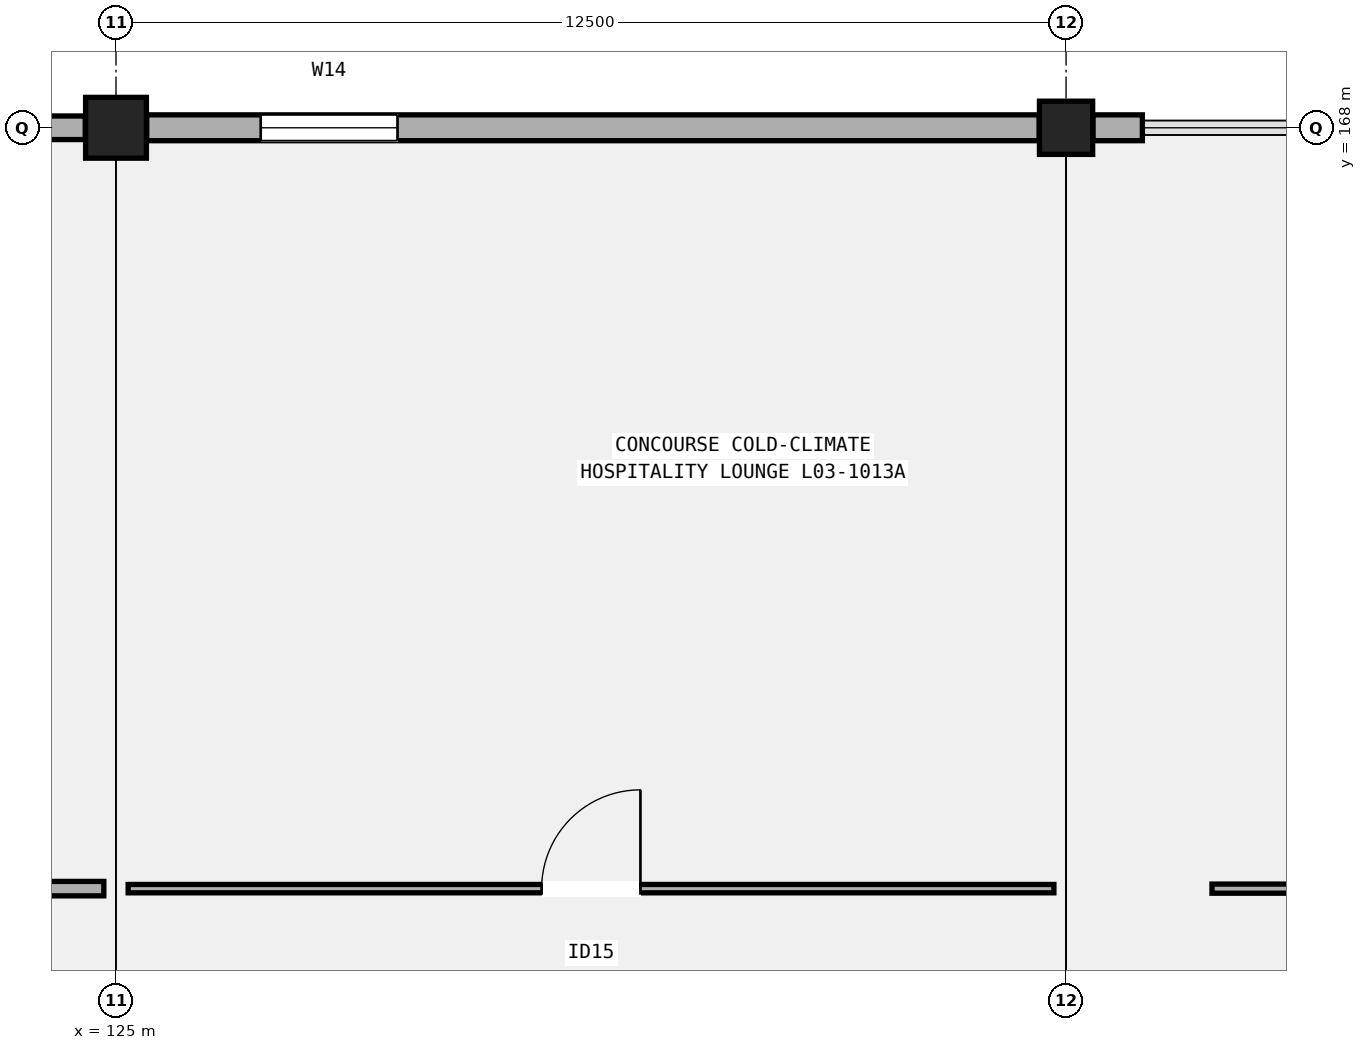
"""IFC4 building model, lengths in metres.
Left out: names, types, materials, properties, quantities, classifications, styles, units other than length and angle.
Written with IfcOpenShell. Run it as: python <this file> out.ifc"""

import sys

from ifc_helpers import new_model, si_unit, direction, frame, frame_2d, origin, origin_2d, place, context, subcontext, project, spatial, rectangle, extrude, element, fill, save


model = new_model("IFC4")
c1 = context("Model", 3, precision=1e-05, world=origin(), true_north=direction((0.0, 1.0)))
c2 = subcontext(c1, "Body", "Model", "MODEL_VIEW")
j1 = project(units=[si_unit("LENGTHUNIT", "METRE"), si_unit("PLANEANGLEUNIT", "RADIAN")], contexts=[c1])
p1 = place(None, origin())
s1 = spatial("IfcSite", under=j1, at=p1, CompositionType="ELEMENT")
p2 = place(p1, origin())
s2 = spatial("IfcBuilding", under=s1, at=p2, CompositionType="ELEMENT")
p3 = place(p2, frame((0.0, 0.0, 15.3)))
s3 = spatial("IfcBuildingStorey", under=s2, at=p3, CompositionType="ELEMENT", Elevation=15.3)
p4 = place(p3, frame((125.0, 168.0, 0.0), z_axis=(0.0, 0.0, 1.0), x_axis=(1.0, 0.0, 0.0)))
e1 = element("IfcColumn", 1, at=p4, inside=s3, PredefinedType="COLUMN", context=c2, shape_type="SweptSolid", body=[
    extrude(rectangle(XDim=0.8, YDim=0.8, at=origin_2d()), origin(), (0.0, 0.0, 1.0), 5.1),
])
p5 = place(p3, frame((137.5, 168.0, 0.0), z_axis=(0.0, 0.0, 1.0), x_axis=(1.0, 0.0, 0.0)))
e2 = element("IfcColumn", 2, at=p5, inside=s3, PredefinedType="COLUMN", context=c2, shape_type="SweptSolid", body=[
    extrude(rectangle(XDim=0.7, YDim=0.7, at=origin_2d()), origin(), (0.0, 0.0, 1.0), 5.1),
])
p6 = place(p3, frame((112.179, 168.0, 0.0), z_axis=(0.0, 0.0, 1.0), x_axis=(1.0, 0.0, 0.0)))
e3 = element("IfcWall", 3, at=p6, inside=s3, PredefinedType="SOLIDWALL", context=c2, shape_type="SweptSolid", body=[
    extrude(rectangle(XDim=12.417, YDim=0.31, at=frame_2d((6.208, 0.0))), origin(), (0.0, 0.0, 1.0), 4.172),
])
p7 = place(p6, frame((2.75, 0.0, 0.95)))
e4 = element("IfcOpeningElement", 4, at=p7, cuts=e3, PredefinedType="OPENING", context=c2, shape_type="SweptSolid", body=[
    extrude(rectangle(XDim=1.65, YDim=2.05, at=frame_2d((0.825, 1.025))), frame((0.0, 0.165, 0.0), z_axis=(0.0, -1.0, 0.0), x_axis=(1.0, 0.0, 0.0)), (0.0, 0.0, 1.0), 0.33),
])
p8 = place(p3, frame((125.404, 168.0, 0.0), z_axis=(0.0, 0.0, 1.0), x_axis=(1.0, 0.0, 0.0)))
e5 = element("IfcWall", 5, at=p8, inside=s3, PredefinedType="SOLIDWALL", context=c2, shape_type="SweptSolid", body=[
    extrude(rectangle(XDim=11.742, YDim=0.34, at=frame_2d((5.871, 0.0))), origin(), (0.0, 0.0, 1.0), 4.06),
])
p9 = place(p8, frame((1.5, 0.0, 0.95)))
e6 = element("IfcOpeningElement", 6, at=p9, cuts=e5, PredefinedType="OPENING", context=c2, shape_type="SweptSolid", body=[
    extrude(rectangle(XDim=1.8, YDim=2.15, at=frame_2d((0.9, 1.075))), frame((0.0, 0.18, 0.0), z_axis=(0.0, -1.0, 0.0), x_axis=(1.0, 0.0, 0.0)), (0.0, 0.0, 1.0), 0.36),
])
p10 = place(p3, frame((137.854, 168.0, 0.0), z_axis=(0.0, 0.0, 1.0), x_axis=(1.0, 0.0, 0.0)))
e7 = element("IfcWall", 7, at=p10, inside=s3, PredefinedType="SOLIDWALL", context=c2, shape_type="SweptSolid", body=[
    extrude(rectangle(XDim=0.65, YDim=0.34, at=frame_2d((0.325, 0.0))), origin(), (0.0, 0.0, 1.0), 4.16),
])
p11 = place(p3, frame((112.16, 157.99, 0.0), z_axis=(0.0, 0.0, 1.0), x_axis=(1.0, 0.0, 0.0)))
e8 = element("IfcWall", 8, at=p11, inside=s3, PredefinedType="PARTITIONING", context=c2, shape_type="SweptSolid", body=[
    extrude(rectangle(XDim=12.68, YDim=0.19, at=frame_2d((6.34, 0.0))), origin(), (0.0, 0.0, 1.0), 4.22),
])
p12 = place(p11, frame((5.75, 0.0, 0.0)))
e9 = element("IfcOpeningElement", 9, at=p12, cuts=e8, PredefinedType="OPENING", context=c2, shape_type="SweptSolid", body=[
    extrude(rectangle(XDim=1.18, YDim=2.2, at=frame_2d((0.59, 1.1))), frame((0.0, 0.105, 0.0), z_axis=(0.0, -1.0, 0.0), x_axis=(1.0, 0.0, 0.0)), (0.0, 0.0, 1.0), 0.21),
])
p13 = place(p3, frame((125.16, 157.99, 0.0), z_axis=(0.0, 0.0, 1.0), x_axis=(1.0, 0.0, 0.0)))
e10 = element("IfcWall", 10, at=p13, inside=s3, PredefinedType="PARTITIONING", context=c2, shape_type="SweptSolid", body=[
    extrude(rectangle(XDim=12.18, YDim=0.11, at=frame_2d((6.09, 0.0))), origin(), (0.0, 0.0, 1.0), 4.22),
])
p14 = place(p13, frame((5.44, 0.0, 0.0)))
e11 = element("IfcOpeningElement", 11, at=p14, cuts=e10, PredefinedType="OPENING", context=c2, shape_type="SweptSolid", body=[
    extrude(rectangle(XDim=1.3, YDim=2.24, at=frame_2d((0.65, 1.12))), frame((0.0, 0.065, 0.0), z_axis=(0.0, -1.0, 0.0), x_axis=(1.0, 0.0, 0.0)), (0.0, 0.0, 1.0), 0.13),
])
p15 = place(p3, frame((139.42, 157.99, 0.0), z_axis=(0.0, 0.0, 1.0), x_axis=(1.0, 0.0, 0.0)))
e12 = element("IfcWall", 12, at=p15, inside=s3, PredefinedType="PARTITIONING", context=c2, shape_type="SweptSolid", body=[
    extrude(rectangle(XDim=10.42, YDim=0.12, at=frame_2d((5.21, 0.0))), origin(), (0.0, 0.0, 1.0), 4.22),
])
p16 = place(p15, frame((4.47, 0.0, 0.0)))
e13 = element("IfcOpeningElement", 13, at=p16, cuts=e12, PredefinedType="OPENING", context=c2, shape_type="SweptSolid", body=[
    extrude(rectangle(XDim=1.48, YDim=2.24, at=frame_2d((0.74, 1.12))), frame((0.0, 0.07, 0.0), z_axis=(0.0, -1.0, 0.0), x_axis=(1.0, 0.0, 0.0)), (0.0, 0.0, 1.0), 0.14),
])
p17 = place(p9, origin())
e14 = element("IfcWindow", 14, at=p17, inside=s3, PartitioningType="SINGLE_PANEL", PredefinedType="WINDOW", context=c2, shape_type="SweptSolid", body=[
    extrude(rectangle(XDim=1.8, YDim=2.15, at=frame_2d((0.9, 1.075))), frame((0.0, 0.03, 0.0), z_axis=(0.0, -1.0, 0.0), x_axis=(1.0, 0.0, 0.0)), (0.0, 0.0, 1.0), 0.06),
])
fill(e6, e14)
p18 = place(p14, origin())
e15 = element("IfcDoor", 15, at=p18, inside=s3, OperationType="SINGLE_SWING_RIGHT", PredefinedType="DOOR", context=c2, shape_type="SweptSolid", body=[
    extrude(rectangle(XDim=1.3, YDim=2.24, at=frame_2d((0.65, 1.12))), frame((0.0, 0.025, 0.0), z_axis=(0.0, -1.0, 0.0), x_axis=(1.0, 0.0, 0.0)), (0.0, 0.0, 1.0), 0.05),
])
fill(e11, e15)
save(model, sys.argv[1])
